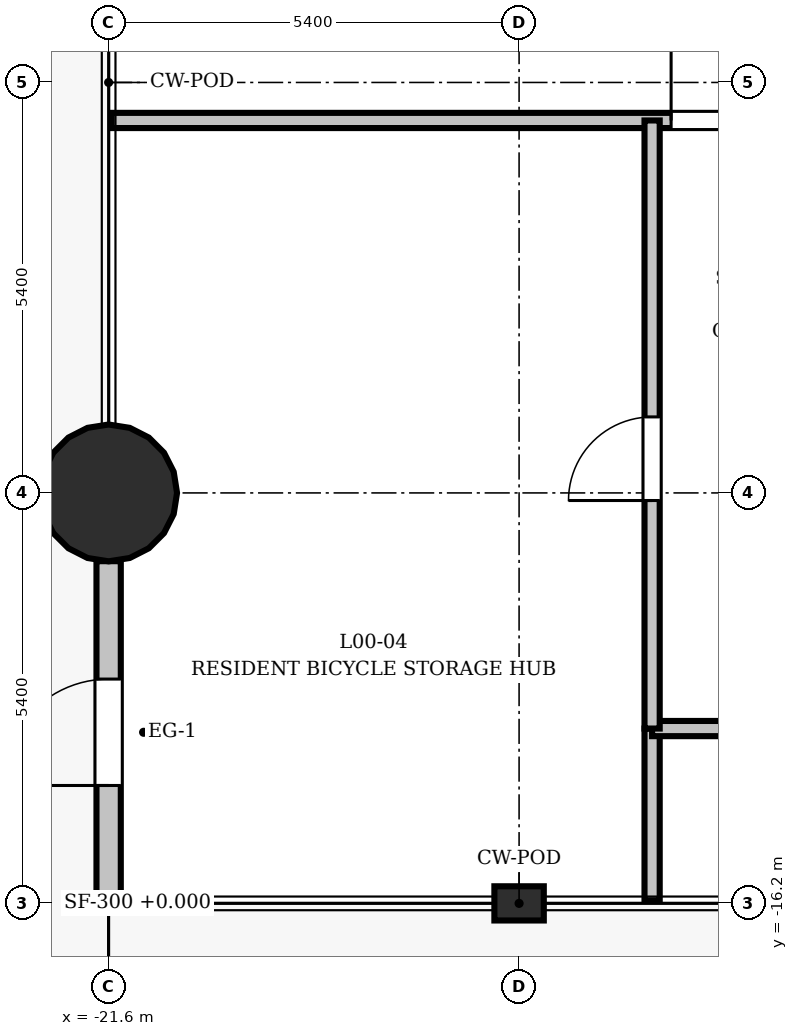
"""IFC4 building model, lengths in metres.
Left out: names, types, materials, properties, quantities, classifications, styles, units other than length and angle.
Written with IfcOpenShell. Run it as: python <this file> out.ifc"""

import sys

from ifc_helpers import new_model, si_unit, direction, frame, frame_2d, origin, origin_2d, place, context, subcontext, project, spatial, rectangle, circle, extrude, element, fill, save


model = new_model("IFC4")
c1 = context("Model", 3, precision=1e-05, world=origin(), true_north=direction((0.0, 1.0)))
c2 = subcontext(c1, "Body", "Model", "MODEL_VIEW")
j1 = project(units=[si_unit("LENGTHUNIT", "METRE"), si_unit("PLANEANGLEUNIT", "RADIAN")], contexts=[c1])
p1 = place(None, origin())
s1 = spatial("IfcSite", under=j1, at=p1, CompositionType="ELEMENT")
p2 = place(p1, origin())
s2 = spatial("IfcBuilding", under=s1, at=p2, CompositionType="ELEMENT")
p3 = place(p2, origin())
s3 = spatial("IfcBuildingStorey", under=s2, at=p3, CompositionType="ELEMENT", Elevation=0.0)
p4 = place(p3, frame((-21.6, -10.8, 0.0), z_axis=(0.0, 0.0, 1.0), x_axis=(1.0, 0.0, 0.0)))
e1 = element("IfcColumn", 1, at=p4, inside=s3, PredefinedType="COLUMN", context=c2, shape_type="SweptSolid", body=[
    extrude(circle(Radius=0.9, at=origin_2d()), origin(), (0.0, 0.0, 1.0), 4.5),
])
p5 = place(p3, frame((-16.2, -16.2, 0.0), z_axis=(0.0, 0.0, 1.0), x_axis=(1.0, 0.0, 0.0)))
e2 = element("IfcColumn", 2, at=p5, inside=s3, PredefinedType="PILASTER", context=c2, shape_type="SweptSolid", body=[
    extrude(rectangle(XDim=0.65, YDim=0.45, at=origin_2d()), origin(), (0.0, 0.0, 1.0), 4.5),
])
p6 = place(p3, frame((-21.6, -16.2, 0.0), z_axis=(0.0, 0.0, 1.0), x_axis=(0.0, 1.0, 0.0)))
e3 = element("IfcWall", 3, at=p6, inside=s3, PredefinedType="STANDARD", context=c2, shape_type="SweptSolid", body=[
    extrude(rectangle(XDim=4.502, YDim=0.32, at=frame_2d((2.251, 0.0))), origin(), (0.0, 0.0, 1.0), 3.329),
])
p7 = place(p6, frame((1.551, 0.0, 0.0)))
e4 = element("IfcOpeningElement", 4, at=p7, cuts=e3, PredefinedType="OPENING", context=c2, shape_type="SweptSolid", body=[
    extrude(rectangle(XDim=1.4, YDim=2.2, at=frame_2d((0.7, 1.1))), frame((0.0, 0.17, 0.0), z_axis=(0.0, -1.0, 0.0), x_axis=(1.0, 0.0, 0.0)), (0.0, 0.0, 1.0), 0.34),
])
p8 = place(p3, frame((-21.56, -5.9, 0.0), z_axis=(0.0, 0.0, 1.0), x_axis=(1.0, 0.0, 0.0)))
e5 = element("IfcWall", 5, at=p8, inside=s3, PredefinedType="PARTITIONING", context=c2, shape_type="SweptSolid", body=[
    extrude(rectangle(XDim=10.71, YDim=0.2, at=frame_2d((5.355, 0.0))), origin(), (0.0, 0.0, 1.0), 3.329),
])
p9 = place(p8, frame((7.36, 0.0, 0.0)))
e6 = element("IfcOpeningElement", 6, at=p9, cuts=e5, PredefinedType="OPENING", context=c2, shape_type="SweptSolid", body=[
    extrude(rectangle(XDim=1.1, YDim=2.1, at=frame_2d((0.55, 1.05))), frame((0.0, 0.11, 0.0), z_axis=(0.0, -1.0, 0.0), x_axis=(1.0, 0.0, 0.0)), (0.0, 0.0, 1.0), 0.22),
])
p10 = place(p3, frame((-14.45, -16.16, 0.0), z_axis=(0.0, 0.0, 1.0), x_axis=(0.0, 1.0, 0.0)))
e7 = element("IfcWall", 7, at=p10, inside=s3, PredefinedType="PARTITIONING", context=c2, shape_type="SweptSolid", body=[
    extrude(rectangle(XDim=2.26, YDim=0.2, at=frame_2d((1.13, 0.0))), origin(), (0.0, 0.0, 1.0), 4.2),
])
p11 = place(p3, frame((-14.45, -13.9, 0.0), z_axis=(0.0, 0.0, 1.0), x_axis=(1.0, 0.0, 0.0)))
e8 = element("IfcWall", 8, at=p11, inside=s3, PredefinedType="PARTITIONING", context=c2, shape_type="SweptSolid", body=[
    extrude(rectangle(XDim=25.9, YDim=0.2, at=frame_2d((12.95, 0.0))), origin(), (0.0, 0.0, 1.0), 3.329),
])
p12 = place(p11, frame((11.0, 0.0, 0.0)))
e9 = element("IfcOpeningElement", 9, at=p12, cuts=e8, PredefinedType="OPENING", context=c2, shape_type="SweptSolid", body=[
    extrude(rectangle(XDim=1.1, YDim=2.1, at=frame_2d((0.55, 1.05))), frame((0.0, 0.11, 0.0), z_axis=(0.0, -1.0, 0.0), x_axis=(1.0, 0.0, 0.0)), (0.0, 0.0, 1.0), 0.22),
])
p13 = place(p3, frame((-14.45, -13.9, 0.0), z_axis=(0.0, 0.0, 1.0), x_axis=(0.0, 1.0, 0.0)))
e10 = element("IfcWall", 10, at=p13, inside=s3, PredefinedType="PARTITIONING", context=c2, shape_type="SweptSolid", body=[
    extrude(rectangle(XDim=8.0, YDim=0.2, at=frame_2d((4.0, 0.0))), origin(), (0.0, 0.0, 1.0), 3.329),
])
p14 = place(p13, frame((3.0, 0.0, 0.0)))
e11 = element("IfcOpeningElement", 11, at=p14, cuts=e10, PredefinedType="OPENING", context=c2, shape_type="SweptSolid", body=[
    extrude(rectangle(XDim=1.1, YDim=2.1, at=frame_2d((0.55, 1.05))), frame((0.0, 0.11, 0.0), z_axis=(0.0, -1.0, 0.0), x_axis=(1.0, 0.0, 0.0)), (0.0, 0.0, 1.0), 0.22),
])
p15 = place(p7, origin())
e12 = element("IfcDoor", 12, at=p15, inside=s3, OperationType="SINGLE_SWING_LEFT", PredefinedType="GATE", context=c2, shape_type="SweptSolid", body=[
    extrude(rectangle(XDim=1.4, YDim=2.2, at=frame_2d((0.7, 1.1))), frame((0.0, 0.025, 0.0), z_axis=(0.0, -1.0, 0.0), x_axis=(1.0, 0.0, 0.0)), (0.0, 0.0, 1.0), 0.05),
])
fill(e4, e12)
p16 = place(p9, origin())
e13 = element("IfcDoor", 13, at=p16, inside=s3, OperationType="SINGLE_SWING_LEFT", PredefinedType="DOOR", context=c2, shape_type="SweptSolid", body=[
    extrude(rectangle(XDim=1.1, YDim=2.1, at=frame_2d((0.55, 1.05))), frame((0.0, 0.025, 0.0), z_axis=(0.0, -1.0, 0.0), x_axis=(1.0, 0.0, 0.0)), (0.0, 0.0, 1.0), 0.05),
])
fill(e6, e13)
p17 = place(p14, origin())
e14 = element("IfcDoor", 14, at=p17, inside=s3, OperationType="SINGLE_SWING_LEFT", PredefinedType="DOOR", context=c2, shape_type="SweptSolid", body=[
    extrude(rectangle(XDim=1.1, YDim=2.1, at=frame_2d((0.55, 1.05))), frame((0.0, 0.025, 0.0), z_axis=(0.0, -1.0, 0.0), x_axis=(1.0, 0.0, 0.0)), (0.0, 0.0, 1.0), 0.05),
])
fill(e11, e14)
save(model, sys.argv[1])
